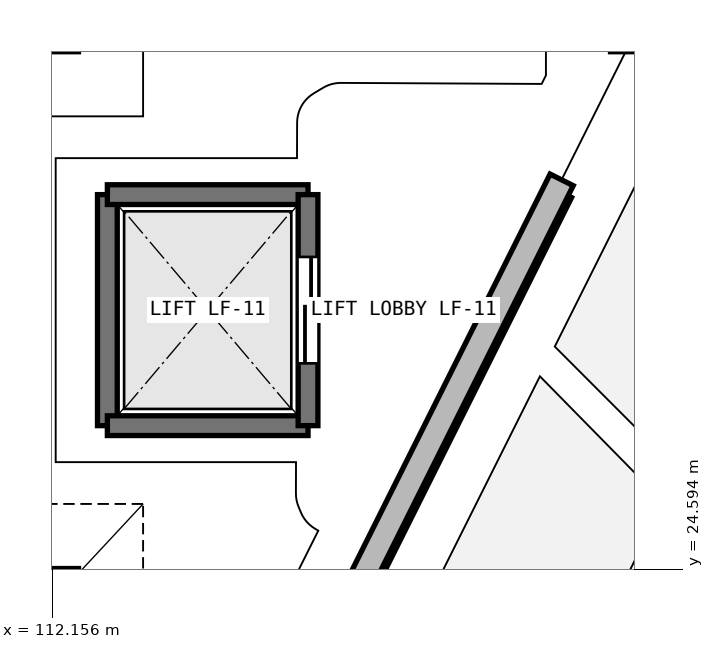
"""IFC4 building model, lengths in metres.
Left out: names, types, materials, properties, quantities, classifications, styles, units other than length and angle.
Written with IfcOpenShell. Run it as: python <this file> out.ifc"""

import sys

from ifc_helpers import new_model, si_unit, direction, frame, frame_2d, origin, place, context, subcontext, project, spatial, rectangle, extrude, element, fill, save


model = new_model("IFC4")
c1 = context("Model", 3, precision=1e-05, world=origin(), true_north=direction((0.0, 1.0)))
c2 = subcontext(c1, "Body", "Model", "MODEL_VIEW")
j1 = project(units=[si_unit("LENGTHUNIT", "METRE"), si_unit("PLANEANGLEUNIT", "RADIAN")], contexts=[c1])
p1 = place(None, origin())
s1 = spatial("IfcSite", under=j1, at=p1, CompositionType="ELEMENT")
p2 = place(p1, origin())
s2 = spatial("IfcBuilding", under=s1, at=p2, CompositionType="ELEMENT")
p3 = place(p2, frame((0.0, 0.0, 10.2)))
s3 = spatial("IfcBuildingStorey", under=s2, at=p3, CompositionType="ELEMENT", Elevation=10.2)
p4 = place(p3, frame((118.857, 29.714, 0.0), z_axis=(0.0, 0.0, 1.0), x_axis=(-0.447200857411, -0.894433559931, 0.0)))
e1 = element("IfcWall", 1, at=p4, inside=s3, PredefinedType="SOLIDWALL", context=c2, shape_type="SweptSolid", body=[
    extrude(rectangle(XDim=7.667, YDim=0.34, at=frame_2d((3.833, 0.0))), origin(), (0.0, 0.0, 1.0), 3.0),
])
p5 = place(p3, frame((112.88, 26.48, 0.0), z_axis=(0.0, 0.0, 1.0), x_axis=(0.0, 1.0, 0.0)))
e2 = element("IfcWall", 2, at=p5, inside=s3, PredefinedType="SHEAR", context=c2, shape_type="SweptSolid", body=[
    extrude(rectangle(XDim=3.04, YDim=0.26, at=frame_2d((1.52, 0.0))), origin(), (0.0, 0.0, 1.0), 4.46),
])
for number, where, z_axis, x_axis in (
    (3, (112.88, 29.52, 0.0), (0.0, 0.0, 1.0), (1.0, 0.0, 0.0)),
    (4, (115.52, 26.48, 0.0), (0.0, 0.0, 1.0), (-1.0, 0.0, 0.0)),
):
    element("IfcWall", number, at=place(p3, frame(where, z_axis=z_axis, x_axis=x_axis)), inside=s3, PredefinedType="SHEAR", context=c2, shape_type="SweptSolid", body=[
        extrude(rectangle(XDim=2.64, YDim=0.26, at=frame_2d((1.32, 0.0))), origin(), (0.0, 0.0, 1.0), 4.46),
    ])
p6 = place(p3, frame((115.52, 29.52, 0.0), z_axis=(0.0, 0.0, 1.0), x_axis=(0.0, -1.0, 0.0)))
e5 = element("IfcWall", 5, at=p6, inside=s3, PredefinedType="SHEAR", context=c2, shape_type="SweptSolid", body=[
    extrude(rectangle(XDim=3.04, YDim=0.26, at=frame_2d((1.52, 0.0))), origin(), (0.0, 0.0, 1.0), 4.46),
])
p7 = place(p6, frame((0.82, 0.0, 0.0)))
e6 = element("IfcOpeningElement", 6, at=p7, cuts=e5, PredefinedType="OPENING", context=c2, shape_type="SweptSolid", body=[
    extrude(rectangle(XDim=1.4, YDim=2.2, at=frame_2d((0.7, 1.1))), frame((0.0, 0.14, 0.0), z_axis=(0.0, -1.0, 0.0), x_axis=(1.0, 0.0, 0.0)), (0.0, 0.0, 1.0), 0.28),
])
p8 = place(p7, origin())
e7 = element("IfcDoor", 7, at=p8, inside=s3, OperationType="SLIDING_TO_LEFT", PredefinedType="DOOR", context=c2, shape_type="SweptSolid", body=[
    extrude(rectangle(XDim=1.4, YDim=2.2, at=frame_2d((0.7, 1.1))), frame((0.0, 0.025, 0.0), z_axis=(0.0, -1.0, 0.0), x_axis=(1.0, 0.0, 0.0)), (0.0, 0.0, 1.0), 0.05),
])
fill(e6, e7)
save(model, sys.argv[1])
